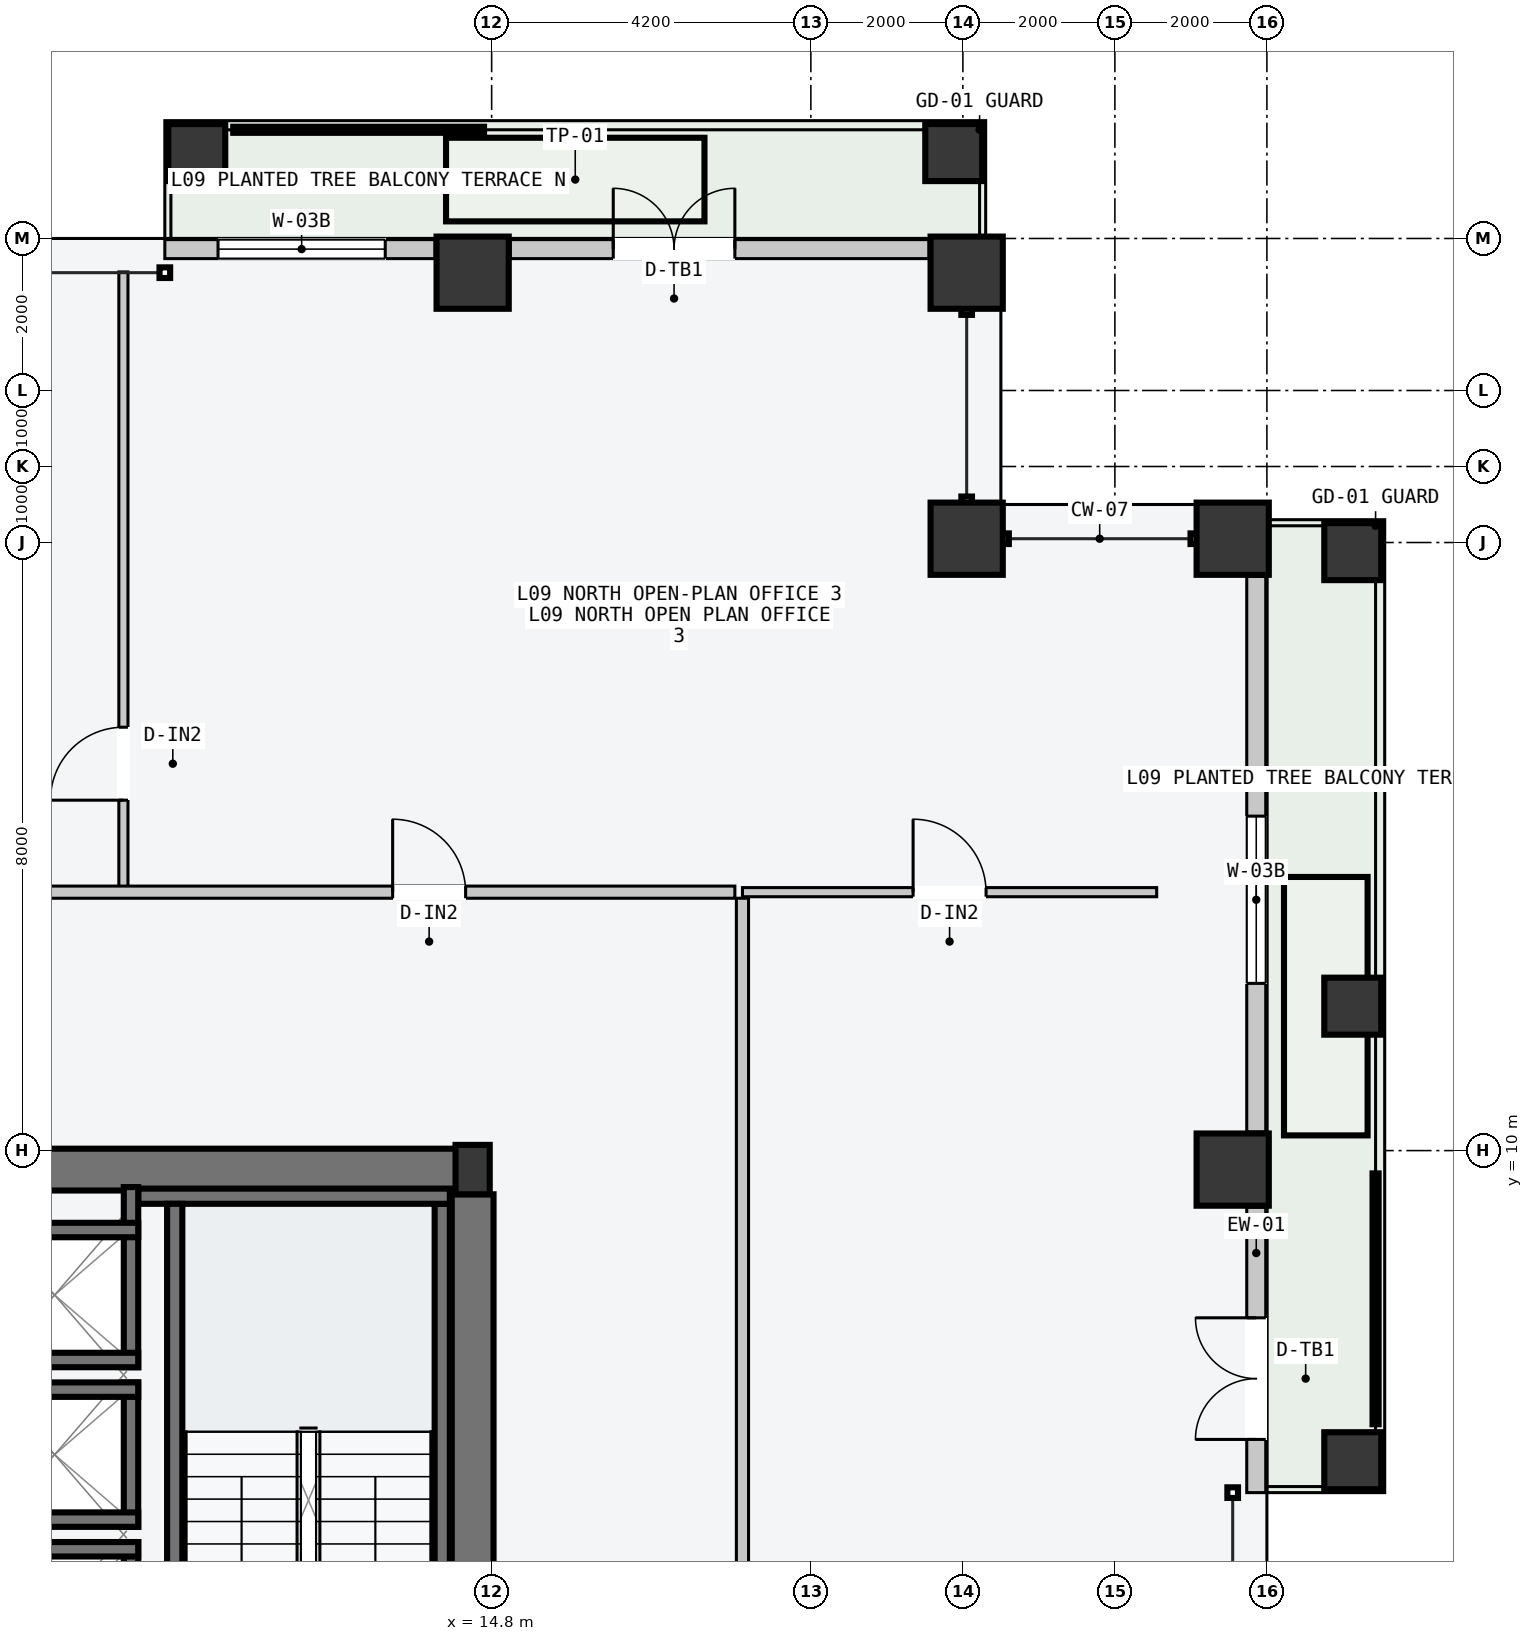
"""IFC4 building model, lengths in metres.
Left out: names, types, materials, properties, quantities, classifications, styles, units other than length and angle.
Written with IfcOpenShell. Run it as: python <this file> out.ifc"""

import sys

from ifc_helpers import new_model, si_unit, direction, frame, frame_2d, origin, origin_2d, place, context, subcontext, project, spatial, rectangle, hollow_rectangle, i_section, extrude, element, fill, save


model = new_model("IFC4")
c1 = context("Model", 3, precision=1e-05, world=origin(), true_north=direction((0.0, 1.0)))
c2 = subcontext(c1, "Body", "Model", "MODEL_VIEW")
j1 = project(units=[si_unit("LENGTHUNIT", "METRE"), si_unit("PLANEANGLEUNIT", "RADIAN")], contexts=[c1])
p1 = place(None, origin())
s1 = spatial("IfcSite", under=j1, at=p1, CompositionType="ELEMENT")
p2 = place(p1, origin())
s2 = spatial("IfcBuilding", under=s1, at=p2, CompositionType="ELEMENT")
p3 = place(p2, frame((0.0, 0.0, 38.4)))
s3 = spatial("IfcBuildingStorey", under=s2, at=p3, CompositionType="ELEMENT", Elevation=38.4)
p4 = place(p3, frame((8.07, 9.75, -0.2), z_axis=(0.0, 0.0, 1.0), x_axis=(1.0, 0.0, 0.0)))
e1 = element("IfcWall", 1, at=p4, inside=s3, PredefinedType="SHEAR", context=c2, shape_type="SweptSolid", body=[
    extrude(rectangle(XDim=6.46, YDim=0.55, at=frame_2d((3.23, 0.0))), origin(), (0.0, 0.0, 1.0), 3.6),
])
p5 = place(p3, frame((14.55, 0.325, -0.2), z_axis=(0.0, 0.0, 1.0), x_axis=(0.0, 1.0, 0.0)))
e2 = element("IfcWall", 2, at=p5, inside=s3, PredefinedType="SHEAR", context=c2, shape_type="SweptSolid", body=[
    extrude(rectangle(XDim=9.1, YDim=0.55, at=frame_2d((4.55, 0.0))), origin(), (0.0, 0.0, 1.0), 3.6),
])
p6 = place(p3, frame((14.15, 1.5, -0.2), z_axis=(0.0, 0.0, 1.0), x_axis=(0.0, 1.0, 0.0)))
e3 = element("IfcWall", 3, at=p6, inside=s3, PredefinedType="SOLIDWALL", context=c2, shape_type="SweptSolid", body=[
    extrude(rectangle(XDim=7.8, YDim=0.2, at=frame_2d((3.9, 0.0))), origin(), (0.0, 0.0, 1.0), 3.6),
])
p7 = place(p3, frame((10.15, 9.4, -0.2), z_axis=(0.0, 0.0, 1.0), x_axis=(1.0, 0.0, 0.0)))
e4 = element("IfcWall", 4, at=p7, inside=s3, PredefinedType="SOLIDWALL", context=c2, shape_type="SweptSolid", body=[
    extrude(rectangle(XDim=4.1, YDim=0.2, at=frame_2d((2.05, 0.0))), origin(), (0.0, 0.0, 1.0), 3.6),
])
p8 = place(p3, frame((10.63, 1.5, -0.2), z_axis=(0.0, 0.0, 1.0), x_axis=(0.0, 1.0, 0.0)))
e5 = element("IfcWall", 5, at=p8, inside=s3, PredefinedType="SOLIDWALL", context=c2, shape_type="SweptSolid", body=[
    extrude(rectangle(XDim=7.8, YDim=0.2, at=frame_2d((3.9, 0.0))), origin(), (0.0, 0.0, 1.0), 3.6),
])
p9 = place(p3, frame((14.55, 9.75, 0.0), z_axis=(0.0, 0.0, 1.0), x_axis=(1.0, 0.0, 0.0)))
e6 = element("IfcColumn", 6, at=p9, inside=s3, PredefinedType="COLUMN", context=c2, shape_type="SweptSolid", body=[
    extrude(i_section(OverallWidth=0.45, OverallDepth=0.65, WebThickness=0.025, FlangeThickness=0.04, at=origin_2d()), origin(), (0.0, 0.0, 1.0), 3.6),
])
for number, where, z_axis, x_axis in (
    (7, (14.55, 21.55, 0.0), (0.0, 0.0, 1.0), (1.0, 0.0, 0.0)),
    (8, (21.05, 21.55, 0.0), (0.0, 0.0, 1.0), (1.0, 0.0, 0.0)),
    (9, (24.55, 9.75, 0.0), (0.0, 0.0, 1.0), (0.0, 1.0, 0.0)),
    (10, (24.55, 18.05, 0.0), (0.0, 0.0, 1.0), (0.0, 1.0, 0.0)),
    (11, (21.05, 18.05, 0.0), (0.0, 0.0, 1.0), (1.0, 0.0, 0.0)),
):
    element("IfcColumn", number, at=place(p3, frame(where, z_axis=z_axis, x_axis=x_axis)), inside=s3, PredefinedType="COLUMN", context=c2, shape_type="SweptSolid", body=[
        extrude(hollow_rectangle(XDim=0.95, YDim=0.95, WallThickness=0.048, at=origin_2d()), origin(), (0.0, 0.0, 1.0), 3.6),
    ])
for number, where, z_axis, x_axis in (
    (12, (10.92, 23.13, 0.0), (0.0, 0.0, 1.0), (1.0, 0.0, 0.0)),
    (13, (20.88, 23.13, 0.0), (0.0, 0.0, 1.0), (1.0, 0.0, 0.0)),
    (14, (26.13, 5.92, 0.0), (0.0, 0.0, 1.0), (0.0, 1.0, 0.0)),
    (15, (26.13, 17.88, 0.0), (0.0, 0.0, 1.0), (0.0, 1.0, 0.0)),
    (16, (26.13, 11.9, 0.0), (0.0, 0.0, 1.0), (0.0, 1.0, 0.0)),
):
    element("IfcColumn", number, at=place(p3, frame(where, z_axis=z_axis, x_axis=x_axis)), inside=s3, PredefinedType="COLUMN", context=c2, shape_type="SweptSolid", body=[
        extrude(hollow_rectangle(XDim=0.75, YDim=0.75, WallThickness=0.032, at=origin_2d()), origin(), (0.0, 0.0, 1.0), 3.6),
    ])
p10 = place(p3, frame((10.5, 21.86, 0.0), z_axis=(0.0, 0.0, 1.0), x_axis=(1.0, 0.0, 0.0)))
e17 = element("IfcWall", 17, at=p10, inside=s3, PredefinedType="STANDARD", context=c2, shape_type="SweptSolid", body=[
    extrude(rectangle(XDim=3.555, YDim=0.25, at=frame_2d((1.777, 0.0))), origin(), (0.0, 0.0, 1.0), 3.4),
])
p11 = place(p10, frame((0.7, 0.0, 0.85)))
e18 = element("IfcOpeningElement", 18, at=p11, cuts=e17, PredefinedType="OPENING", context=c2, shape_type="SweptSolid", body=[
    extrude(rectangle(XDim=2.2, YDim=2.1, at=frame_2d((1.1, 1.05))), frame((0.0, 0.135, 0.0), z_axis=(0.0, -1.0, 0.0), x_axis=(1.0, 0.0, 0.0)), (0.0, 0.0, 1.0), 0.27),
])
p12 = place(p3, frame((15.045, 21.86, 0.0), z_axis=(0.0, 0.0, 1.0), x_axis=(1.0, 0.0, 0.0)))
e19 = element("IfcWall", 19, at=p12, inside=s3, PredefinedType="STANDARD", context=c2, shape_type="SweptSolid", body=[
    extrude(rectangle(XDim=5.51, YDim=0.25, at=frame_2d((2.755, 0.0))), origin(), (0.0, 0.0, 1.0), 3.4),
])
p13 = place(p12, frame((1.355, 0.0, 0.0)))
e20 = element("IfcOpeningElement", 20, at=p13, cuts=e19, PredefinedType="OPENING", context=c2, shape_type="SweptSolid", body=[
    extrude(rectangle(XDim=1.6, YDim=2.2, at=frame_2d((0.8, 1.1))), frame((0.0, 0.135, 0.0), z_axis=(0.0, -1.0, 0.0), x_axis=(1.0, 0.0, 0.0)), (0.0, 0.0, 1.0), 0.27),
])
p14 = place(p3, frame((24.86, 5.5, 0.0), z_axis=(0.0, 0.0, 1.0), x_axis=(0.0, 1.0, 0.0)))
e21 = element("IfcWall", 21, at=p14, inside=s3, PredefinedType="STANDARD", context=c2, shape_type="SweptSolid", body=[
    extrude(rectangle(XDim=3.755, YDim=0.25, at=frame_2d((1.877, 0.0))), origin(), (0.0, 0.0, 1.0), 3.4),
])
p15 = place(p14, frame((0.7, 0.0, 0.0)))
e22 = element("IfcOpeningElement", 22, at=p15, cuts=e21, PredefinedType="OPENING", context=c2, shape_type="SweptSolid", body=[
    extrude(rectangle(XDim=1.6, YDim=2.2, at=frame_2d((0.8, 1.1))), frame((0.0, 0.135, 0.0), z_axis=(0.0, -1.0, 0.0), x_axis=(1.0, 0.0, 0.0)), (0.0, 0.0, 1.0), 0.27),
])
p16 = place(p3, frame((24.86, 10.245, 0.0), z_axis=(0.0, 0.0, 1.0), x_axis=(0.0, 1.0, 0.0)))
e23 = element("IfcWall", 23, at=p16, inside=s3, PredefinedType="STANDARD", context=c2, shape_type="SweptSolid", body=[
    extrude(rectangle(XDim=7.31, YDim=0.25, at=frame_2d((3.655, 0.0))), origin(), (0.0, 0.0, 1.0), 3.4),
])
p17 = place(p16, frame((1.955, 0.0, 0.85)))
e24 = element("IfcOpeningElement", 24, at=p17, cuts=e23, PredefinedType="OPENING", context=c2, shape_type="SweptSolid", body=[
    extrude(rectangle(XDim=2.2, YDim=2.1, at=frame_2d((1.1, 1.05))), frame((0.0, 0.135, 0.0), z_axis=(0.0, -1.0, 0.0), x_axis=(1.0, 0.0, 0.0)), (0.0, 0.0, 1.0), 0.27),
])
p18 = place(p3, frame((10.055, 2.95, -0.2), z_axis=(0.0, 0.0, 1.0), x_axis=(0.0, 1.0, 0.0)))
e25 = element("IfcWall", 25, at=p18, inside=s3, PredefinedType="SOLIDWALL", context=c2, shape_type="SweptSolid", body=[
    extrude(rectangle(XDim=1.9, YDim=0.19, at=frame_2d((0.95, 0.0))), origin(), (0.0, 0.0, 1.0), 3.6),
])
p19 = place(p3, frame((7.95, 4.755, -0.2), z_axis=(0.0, 0.0, 1.0), x_axis=(1.0, 0.0, 0.0)))
e26 = element("IfcWall", 26, at=p19, inside=s3, PredefinedType="SOLIDWALL", context=c2, shape_type="SweptSolid", body=[
    extrude(rectangle(XDim=2.2, YDim=0.19, at=frame_2d((1.1, 0.0))), origin(), (0.0, 0.0, 1.0), 3.6),
])
p20 = place(p3, frame((10.055, 5.05, -0.2), z_axis=(0.0, 0.0, 1.0), x_axis=(0.0, 1.0, 0.0)))
e27 = element("IfcWall", 27, at=p20, inside=s3, PredefinedType="SOLIDWALL", context=c2, shape_type="SweptSolid", body=[
    extrude(rectangle(XDim=1.9, YDim=0.19, at=frame_2d((0.95, 0.0))), origin(), (0.0, 0.0, 1.0), 3.6),
])
for number, where, z_axis, x_axis in (
    (28, (7.95, 6.855, -0.2), (0.0, 0.0, 1.0), (1.0, 0.0, 0.0)),
    (29, (7.95, 5.145, -0.2), (0.0, 0.0, 1.0), (1.0, 0.0, 0.0)),
):
    element("IfcWall", number, at=place(p3, frame(where, z_axis=z_axis, x_axis=x_axis)), inside=s3, PredefinedType="SOLIDWALL", context=c2, shape_type="SweptSolid", body=[
        extrude(rectangle(XDim=2.2, YDim=0.19, at=frame_2d((1.1, 0.0))), origin(), (0.0, 0.0, 1.0), 3.6),
    ])
p21 = place(p3, frame((10.055, 7.15, -0.2), z_axis=(0.0, 0.0, 1.0), x_axis=(0.0, 1.0, 0.0)))
e30 = element("IfcWall", 30, at=p21, inside=s3, PredefinedType="SOLIDWALL", context=c2, shape_type="SweptSolid", body=[
    extrude(rectangle(XDim=2.37, YDim=0.19, at=frame_2d((1.185, 0.0))), origin(), (0.0, 0.0, 1.0), 3.6),
])
for number, where, z_axis, x_axis in (
    (31, (7.95, 8.955, -0.2), (0.0, 0.0, 1.0), (1.0, 0.0, 0.0)),
    (32, (7.95, 7.245, -0.2), (0.0, 0.0, 1.0), (1.0, 0.0, 0.0)),
):
    element("IfcWall", number, at=place(p3, frame(where, z_axis=z_axis, x_axis=x_axis)), inside=s3, PredefinedType="SOLIDWALL", context=c2, shape_type="SweptSolid", body=[
        extrude(rectangle(XDim=2.2, YDim=0.19, at=frame_2d((1.1, 0.0))), origin(), (0.0, 0.0, 1.0), 3.6),
    ])
p22 = place(p3, frame((9.955, 13.46, 0.0), z_axis=(0.0, 0.0, 1.0), x_axis=(0.0, 1.0, 0.0)))
e33 = element("IfcWall", 33, at=p22, inside=s3, PredefinedType="PARTITIONING", context=c2, shape_type="SweptSolid", body=[
    extrude(rectangle(XDim=8.1, YDim=0.12, at=frame_2d((4.05, 0.0))), origin(), (0.0, 0.0, 1.0), 3.4),
])
p23 = place(p22, frame((1.15, 0.0, 0.0)))
e34 = element("IfcOpeningElement", 34, at=p23, cuts=e33, PredefinedType="OPENING", context=c2, shape_type="SweptSolid", body=[
    extrude(rectangle(XDim=0.96, YDim=2.18, at=frame_2d((0.48, 1.09))), frame((0.0, 0.07, 0.0), z_axis=(0.0, -1.0, 0.0), x_axis=(1.0, 0.0, 0.0)), (0.0, 0.0, 1.0), 0.14),
])
p24 = place(p3, frame((-18.0, 13.4, 0.0), z_axis=(0.0, 0.0, 1.0), x_axis=(1.0, 0.0, 0.0)))
e35 = element("IfcWall", 35, at=p24, inside=s3, PredefinedType="PARTITIONING", context=c2, shape_type="SweptSolid", body=[
    extrude(rectangle(XDim=36.0, YDim=0.16, at=frame_2d((18.0, 0.0))), origin(), (0.0, 0.0, 1.0), 3.4),
])
p25 = place(p24, frame((7.105, 0.0, 0.0)))
e36 = element("IfcOpeningElement", 36, at=p25, cuts=e35, PredefinedType="OPENING", context=c2, shape_type="SweptSolid", body=[
    extrude(rectangle(XDim=1.4, YDim=2.2, at=frame_2d((0.7, 1.1))), frame((0.0, 0.09, 0.0), z_axis=(0.0, -1.0, 0.0), x_axis=(1.0, 0.0, 0.0)), (0.0, 0.0, 1.0), 0.18),
])
p26 = place(p24, frame((21.333, 0.0, 0.0)))
e37 = element("IfcOpeningElement", 37, at=p26, cuts=e35, PredefinedType="OPENING", context=c2, shape_type="SweptSolid", body=[
    extrude(rectangle(XDim=0.9, YDim=2.15, at=frame_2d((0.45, 1.075))), frame((0.0, 0.09, 0.0), z_axis=(0.0, -1.0, 0.0), x_axis=(1.0, 0.0, 0.0)), (0.0, 0.0, 1.0), 0.18),
])
p27 = place(p24, frame((31.498, 0.0, 0.0)))
e38 = element("IfcOpeningElement", 38, at=p27, cuts=e35, PredefinedType="OPENING", context=c2, shape_type="SweptSolid", body=[
    extrude(rectangle(XDim=0.96, YDim=2.18, at=frame_2d((0.48, 1.09))), frame((0.0, 0.09, 0.0), z_axis=(0.0, -1.0, 0.0), x_axis=(1.0, 0.0, 0.0)), (0.0, 0.0, 1.0), 0.18),
])
p28 = place(p3, frame((18.1, 13.4, 0.0), z_axis=(0.0, 0.0, 1.0), x_axis=(1.0, 0.0, 0.0)))
e39 = element("IfcWall", 39, at=p28, inside=s3, PredefinedType="PARTITIONING", context=c2, shape_type="SweptSolid", body=[
    extrude(rectangle(XDim=5.45, YDim=0.12, at=frame_2d((2.725, 0.0))), origin(), (0.0, 0.0, 1.0), 3.4),
])
p29 = place(p28, frame((2.245, 0.0, 0.0)))
e40 = element("IfcOpeningElement", 40, at=p29, cuts=e39, PredefinedType="OPENING", context=c2, shape_type="SweptSolid", body=[
    extrude(rectangle(XDim=0.96, YDim=2.18, at=frame_2d((0.48, 1.09))), frame((0.0, 0.07, 0.0), z_axis=(0.0, -1.0, 0.0), x_axis=(1.0, 0.0, 0.0)), (0.0, 0.0, 1.0), 0.14),
])
p30 = place(p3, frame((18.1, -13.32, 0.0), z_axis=(0.0, 0.0, 1.0), x_axis=(0.0, 1.0, 0.0)))
e41 = element("IfcWall", 41, at=p30, inside=s3, PredefinedType="PARTITIONING", context=c2, shape_type="SweptSolid", body=[
    extrude(rectangle(XDim=26.64, YDim=0.16, at=frame_2d((13.32, 0.0))), origin(), (0.0, 0.0, 1.0), 3.4),
])
p31 = place(p30, frame((12.87, 0.0, 0.0)))
e42 = element("IfcOpeningElement", 42, at=p31, cuts=e41, PredefinedType="OPENING", context=c2, shape_type="SweptSolid", body=[
    extrude(rectangle(XDim=0.9, YDim=2.15, at=frame_2d((0.45, 1.075))), frame((0.0, 0.09, 0.0), z_axis=(0.0, -1.0, 0.0), x_axis=(1.0, 0.0, 0.0)), (0.0, 0.0, 1.0), 0.18),
])
p32 = place(p11, origin())
e43 = element("IfcWindow", 43, at=p32, inside=s3, PartitioningType="SINGLE_PANEL", PredefinedType="WINDOW", context=c2, shape_type="SweptSolid", body=[
    extrude(rectangle(XDim=2.2, YDim=2.1, at=frame_2d((1.1, 1.05))), frame((0.0, 0.03, 0.0), z_axis=(0.0, -1.0, 0.0), x_axis=(1.0, 0.0, 0.0)), (0.0, 0.0, 1.0), 0.06),
])
fill(e18, e43)
p33 = place(p13, origin())
e44 = element("IfcDoor", 44, at=p33, inside=s3, OperationType="DOUBLE_DOOR_SINGLE_SWING", PredefinedType="DOOR", context=c2, shape_type="SweptSolid", body=[
    extrude(rectangle(XDim=1.6, YDim=2.2, at=frame_2d((0.8, 1.1))), frame((0.0, 0.025, 0.0), z_axis=(0.0, -1.0, 0.0), x_axis=(1.0, 0.0, 0.0)), (0.0, 0.0, 1.0), 0.05),
])
fill(e20, e44)
p34 = place(p15, origin())
e45 = element("IfcDoor", 45, at=p34, inside=s3, OperationType="DOUBLE_DOOR_SINGLE_SWING", PredefinedType="DOOR", context=c2, shape_type="SweptSolid", body=[
    extrude(rectangle(XDim=1.6, YDim=2.2, at=frame_2d((0.8, 1.1))), frame((0.0, 0.025, 0.0), z_axis=(0.0, -1.0, 0.0), x_axis=(1.0, 0.0, 0.0)), (0.0, 0.0, 1.0), 0.05),
])
fill(e22, e45)
p35 = place(p17, origin())
e46 = element("IfcWindow", 46, at=p35, inside=s3, PartitioningType="SINGLE_PANEL", PredefinedType="WINDOW", context=c2, shape_type="SweptSolid", body=[
    extrude(rectangle(XDim=2.2, YDim=2.1, at=frame_2d((1.1, 1.05))), frame((0.0, 0.03, 0.0), z_axis=(0.0, -1.0, 0.0), x_axis=(1.0, 0.0, 0.0)), (0.0, 0.0, 1.0), 0.06),
])
fill(e24, e46)
p36 = place(p23, origin())
e47 = element("IfcDoor", 47, at=p36, inside=s3, OperationType="SINGLE_SWING_LEFT", PredefinedType="DOOR", context=c2, shape_type="SweptSolid", body=[
    extrude(rectangle(XDim=0.96, YDim=2.18, at=frame_2d((0.48, 1.09))), frame((0.0, 0.025, 0.0), z_axis=(0.0, -1.0, 0.0), x_axis=(1.0, 0.0, 0.0)), (0.0, 0.0, 1.0), 0.05),
])
fill(e34, e47)
p37 = place(p27, origin())
e48 = element("IfcDoor", 48, at=p37, inside=s3, OperationType="SINGLE_SWING_LEFT", PredefinedType="DOOR", context=c2, shape_type="SweptSolid", body=[
    extrude(rectangle(XDim=0.96, YDim=2.18, at=frame_2d((0.48, 1.09))), frame((0.0, 0.025, 0.0), z_axis=(0.0, -1.0, 0.0), x_axis=(1.0, 0.0, 0.0)), (0.0, 0.0, 1.0), 0.05),
])
fill(e38, e48)
p38 = place(p29, origin())
e49 = element("IfcDoor", 49, at=p38, inside=s3, OperationType="SINGLE_SWING_LEFT", PredefinedType="DOOR", context=c2, shape_type="SweptSolid", body=[
    extrude(rectangle(XDim=0.96, YDim=2.18, at=frame_2d((0.48, 1.09))), frame((0.0, 0.025, 0.0), z_axis=(0.0, -1.0, 0.0), x_axis=(1.0, 0.0, 0.0)), (0.0, 0.0, 1.0), 0.05),
])
fill(e40, e49)
save(model, sys.argv[1])
